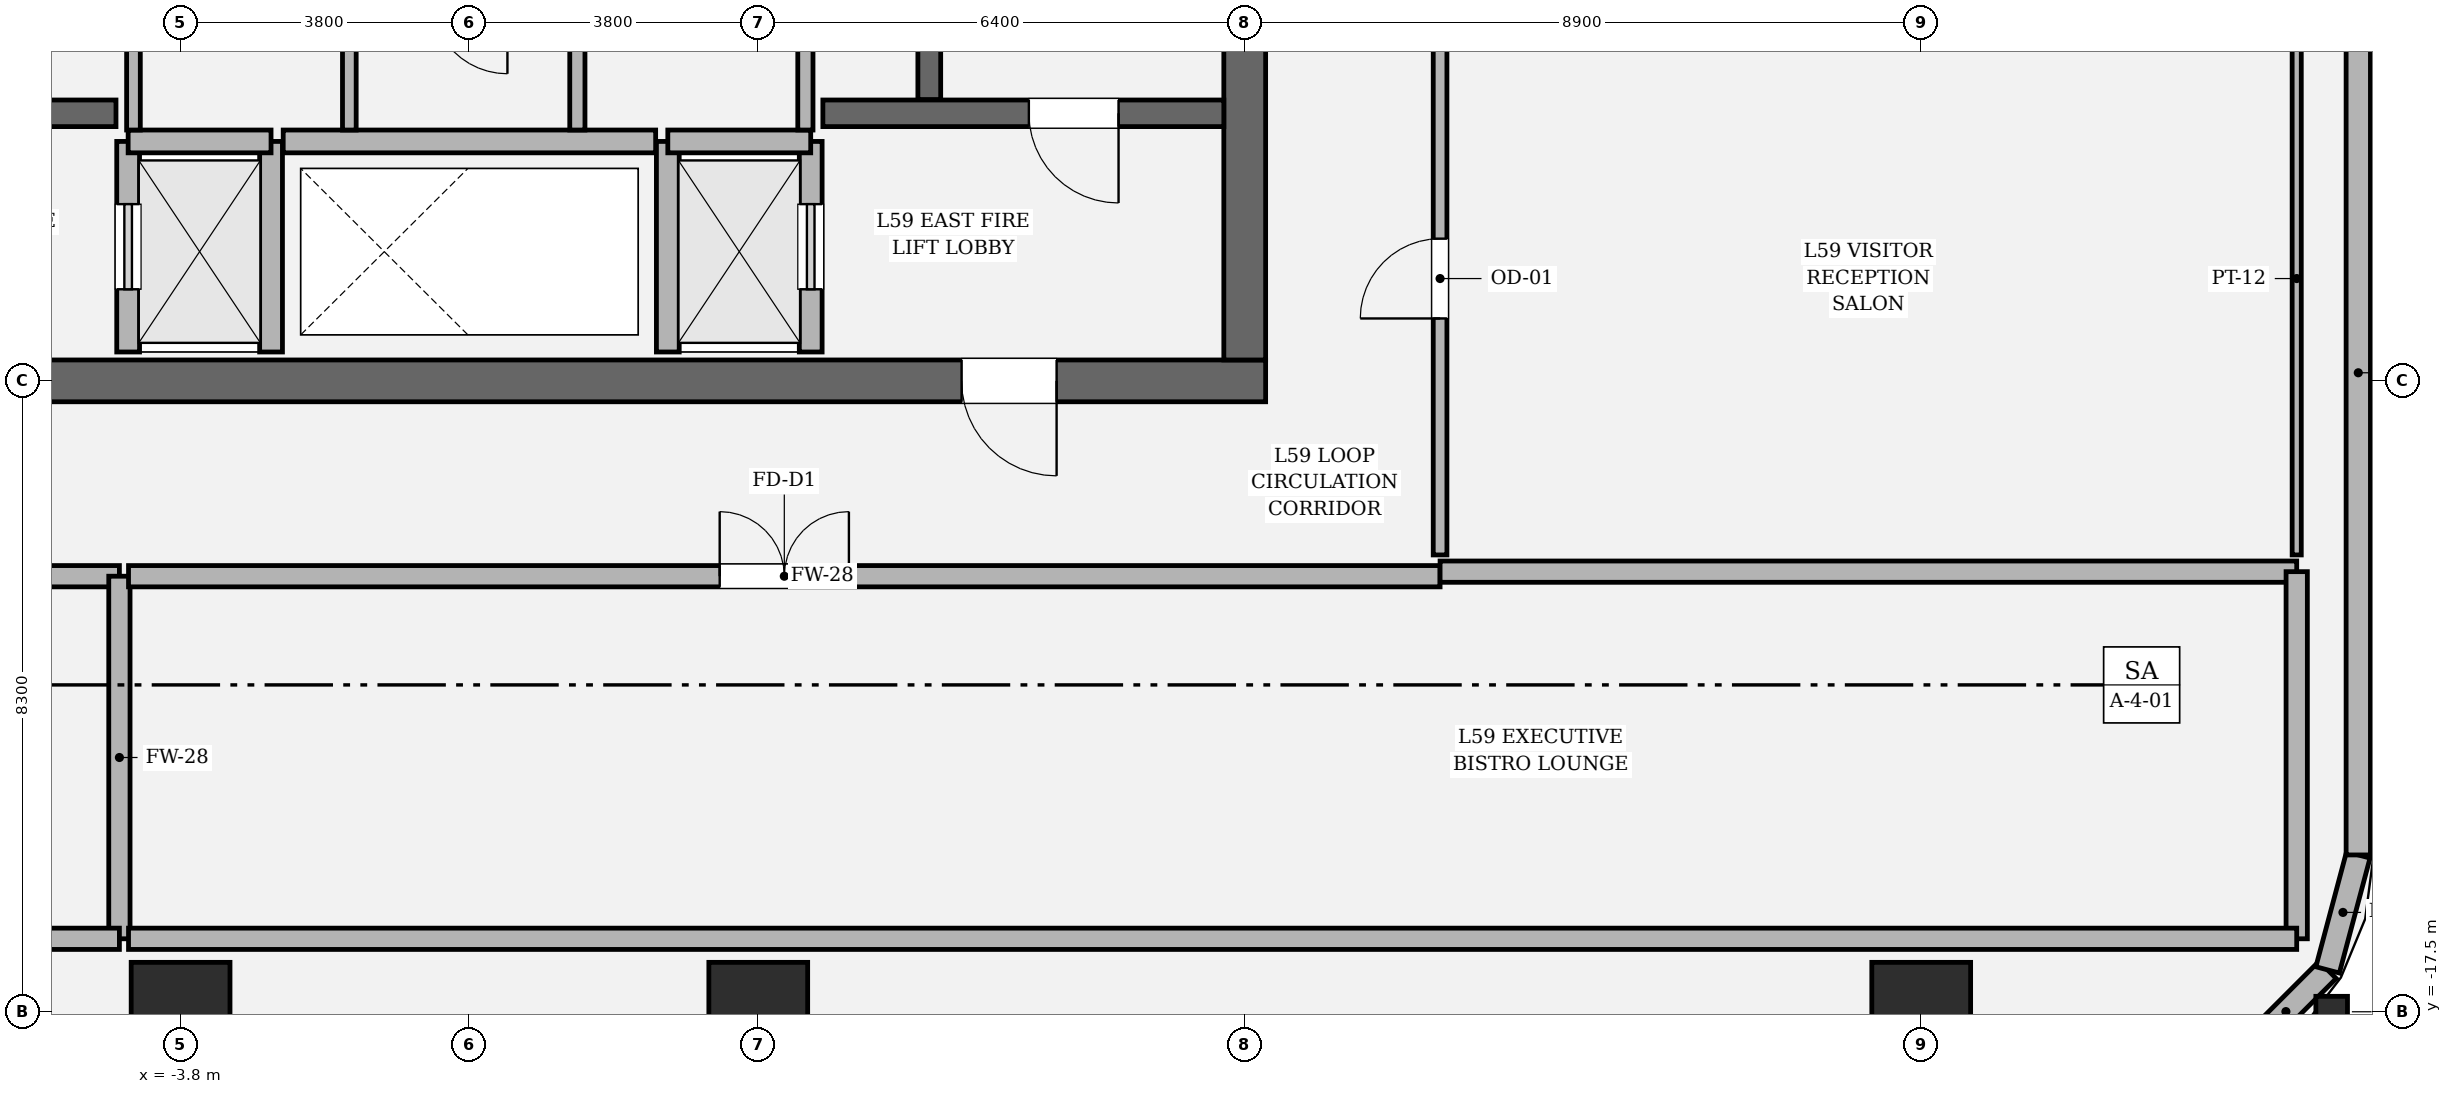
"""IFC4 building model, lengths in metres.
Left out: names, types, materials, properties, quantities, classifications, styles, units other than length and angle.
Written with IfcOpenShell. Run it as: python <this file> out.ifc"""

import sys

from ifc_helpers import new_model, si_unit, direction, frame, frame_2d, origin, origin_2d, place, context, subcontext, project, spatial, rectangle, hollow_rectangle, i_section, extrude, element, fill, save


model = new_model("IFC4")
c1 = context("Model", 3, precision=1e-05, world=origin(), true_north=direction((0.0, 1.0)))
c2 = subcontext(c1, "Body", "Model", "MODEL_VIEW")
j1 = project(units=[si_unit("LENGTHUNIT", "METRE"), si_unit("PLANEANGLEUNIT", "RADIAN")], contexts=[c1])
p1 = place(None, origin())
s1 = spatial("IfcSite", under=j1, at=p1, CompositionType="ELEMENT")
p2 = place(p1, origin())
s2 = spatial("IfcBuilding", under=s1, at=p2, CompositionType="ELEMENT")
p3 = place(p2, frame((0.0, 0.0, 251.4)))
s3 = spatial("IfcBuildingStorey", under=s2, at=p3, CompositionType="ELEMENT", Elevation=251.4)
p4 = place(p3, frame((10.475, -9.2, 0.0), z_axis=(0.0, 0.0, 1.0), x_axis=(-1.0, 0.0, 0.0)))
e1 = element("IfcWall", 1, at=p4, inside=s3, PredefinedType="SHEAR", context=c2, shape_type="SweptSolid", body=[
    extrude(rectangle(XDim=20.95, YDim=0.55, at=frame_2d((10.475, 0.0))), origin(), (0.0, 0.0, 1.0), 4.05),
])
p5 = place(p4, frame((2.75, 0.0, 0.0)))
e2 = element("IfcOpeningElement", 2, at=p5, cuts=e1, PredefinedType="OPENING", context=c2, shape_type="SweptSolid", body=[
    extrude(rectangle(XDim=1.25, YDim=2.25, at=frame_2d((0.625, 1.125))), frame((0.0, 0.285, 0.0), z_axis=(0.0, -1.0, 0.0), x_axis=(1.0, 0.0, 0.0)), (0.0, 0.0, 1.0), 0.57),
])
p6 = place(p4, frame((16.95, 0.0, 0.0)))
e3 = element("IfcOpeningElement", 3, at=p6, cuts=e1, PredefinedType="OPENING", context=c2, shape_type="SweptSolid", body=[
    extrude(rectangle(XDim=1.25, YDim=2.25, at=frame_2d((0.625, 1.125))), frame((0.0, 0.285, 0.0), z_axis=(0.0, -1.0, 0.0), x_axis=(1.0, 0.0, 0.0)), (0.0, 0.0, 1.0), 0.57),
])
p7 = place(p3, frame((10.2, 8.925, 0.0), z_axis=(0.0, 0.0, 1.0), x_axis=(0.0, -1.0, 0.0)))
e4 = element("IfcWall", 4, at=p7, inside=s3, PredefinedType="SHEAR", context=c2, shape_type="SweptSolid", body=[
    extrude(rectangle(XDim=17.85, YDim=0.55, at=frame_2d((8.925, 0.0))), origin(), (0.0, 0.0, 1.0), 4.05),
])
p8 = place(p7, frame((3.955, 0.0, 0.0)))
e5 = element("IfcOpeningElement", 5, at=p8, cuts=e4, PredefinedType="OPENING", context=c2, shape_type="SweptSolid", body=[
    extrude(rectangle(XDim=1.18, YDim=2.2, at=frame_2d((0.59, 1.1))), frame((0.0, 0.285, 0.0), z_axis=(0.0, -1.0, 0.0), x_axis=(1.0, 0.0, 0.0)), (0.0, 0.0, 1.0), 0.57),
])
p9 = place(p3, frame((6.05, 3.45, 0.0), z_axis=(0.0, 0.0, 1.0), x_axis=(0.0, -1.0, 0.0)))
e6 = element("IfcWall", 6, at=p9, inside=s3, PredefinedType="SOLIDWALL", context=c2, shape_type="SweptSolid", body=[
    extrude(rectangle(XDim=8.95, YDim=0.3, at=frame_2d((4.475, 0.0))), origin(), (0.0, 0.0, 1.0), 4.05),
])
p10 = place(p3, frame((-9.925, -5.68, 0.0), z_axis=(0.0, 0.0, 1.0), x_axis=(1.0, 0.0, 0.0)))
e7 = element("IfcWall", 7, at=p10, inside=s3, PredefinedType="SOLIDWALL", context=c2, shape_type="SweptSolid", body=[
    extrude(rectangle(XDim=5.275, YDim=0.35, at=frame_2d((2.638, 0.0))), origin(), (0.0, 0.0, 1.0), 4.05),
])
p11 = place(p10, frame((1.385, 0.0, 0.0)))
e8 = element("IfcOpeningElement", 8, at=p11, cuts=e7, PredefinedType="OPENING", context=c2, shape_type="SweptSolid", body=[
    extrude(rectangle(XDim=1.18, YDim=2.2, at=frame_2d((0.59, 1.1))), frame((0.0, 0.185, 0.0), z_axis=(0.0, -1.0, 0.0), x_axis=(1.0, 0.0, 0.0)), (0.0, 0.0, 1.0), 0.37),
])
p12 = place(p3, frame((4.65, -5.68, 0.0), z_axis=(0.0, 0.0, 1.0), x_axis=(1.0, 0.0, 0.0)))
e9 = element("IfcWall", 9, at=p12, inside=s3, PredefinedType="SOLIDWALL", context=c2, shape_type="SweptSolid", body=[
    extrude(rectangle(XDim=5.275, YDim=0.35, at=frame_2d((2.638, 0.0))), origin(), (0.0, 0.0, 1.0), 4.05),
])
p13 = place(p12, frame((2.71, 0.0, 0.0)))
e10 = element("IfcOpeningElement", 10, at=p13, cuts=e9, PredefinedType="OPENING", context=c2, shape_type="SweptSolid", body=[
    extrude(rectangle(XDim=1.18, YDim=2.2, at=frame_2d((0.59, 1.1))), frame((0.0, 0.185, 0.0), z_axis=(0.0, -1.0, 0.0), x_axis=(1.0, 0.0, 0.0)), (0.0, 0.0, 1.0), 0.37),
])
for number, where, z_axis, x_axis in (
    (11, (-3.8, -17.5, 0.0), (0.0, 0.0, 1.0), (1.0, 0.0, 0.0)),
    (12, (3.8, -17.5, 0.0), (0.0, 0.0, 1.0), (1.0, 0.0, 0.0)),
    (13, (19.1, -17.5, 0.0), (0.0, 0.0, 1.0), (1.0, 0.0, 0.0)),
):
    element("IfcColumn", number, at=place(p3, frame(where, z_axis=z_axis, x_axis=x_axis)), inside=s3, PredefinedType="COLUMN", context=c2, shape_type="SweptSolid", body=[
        extrude(hollow_rectangle(XDim=1.3, YDim=1.3, WallThickness=0.038, at=origin_2d()), origin(), (0.0, 0.0, 1.0), 4.05),
    ])
p14 = place(p3, frame((24.5, -17.5, 0.0), z_axis=(0.0, 0.0, 1.0), x_axis=(0.0, 1.0, 0.0)))
e14 = element("IfcColumn", 14, at=p14, inside=s3, PredefinedType="COLUMN", context=c2, shape_type="SweptSolid", body=[
    extrude(i_section(OverallWidth=0.406, OverallDepth=0.416, WebThickness=0.029, FlangeThickness=0.048, FilletRadius=0.018, at=origin_2d()), origin(), (0.0, 0.0, 1.0), 4.048),
])
p15 = place(p3, frame((23.349, -18.047, 0.0), z_axis=(0.0, 0.0, 1.0), x_axis=(0.707106781187, 0.707106781187, 0.0)))
e15 = element("IfcWall", 15, at=p15, inside=s3, PredefinedType="SOLIDWALL", context=c2, shape_type="SweptSolid", body=[
    extrude(rectangle(XDim=1.552, YDim=0.32, at=frame_2d((0.776, 0.0))), origin(), (0.0, 0.0, 1.0), 2.524),
])
p16 = place(p3, frame((24.447, -16.949, 0.0), z_axis=(0.0, 0.0, 1.0), x_axis=(0.257847112249, 0.966185730957, 0.0)))
e16 = element("IfcWall", 16, at=p16, inside=s3, PredefinedType="SOLIDWALL", context=c2, shape_type="SweptSolid", body=[
    extrude(rectangle(XDim=1.565, YDim=0.32, at=frame_2d((0.783, 0.0))), origin(), (0.0, 0.0, 1.0), 2.564),
])
p17 = place(p3, frame((24.85, -15.437, 0.0), z_axis=(0.0, 0.0, 1.0), x_axis=(0.0, 1.0, 0.0)))
e17 = element("IfcWall", 17, at=p17, inside=s3, PredefinedType="SOLIDWALL", context=c2, shape_type="SweptSolid", body=[
    extrude(rectangle(XDim=12.687, YDim=0.32, at=frame_2d((6.344, 0.0))), origin(), (0.0, 0.0, 1.0), 2.564),
])
p18 = place(p3, frame((-4.49, -8.82, 0.0), z_axis=(0.0, 0.0, 1.0), x_axis=(0.0, 1.0, 0.0)))
e18 = element("IfcWall", 18, at=p18, inside=s3, PredefinedType="SOLIDWALL", context=c2, shape_type="SweptSolid", body=[
    extrude(rectangle(XDim=2.77, YDim=0.3, at=frame_2d((1.385, 0.0))), origin(), (0.0, 0.0, 1.0), 3.85),
])
p19 = place(p18, frame((0.825, 0.0, 0.0)))
e19 = element("IfcOpeningElement", 19, at=p19, cuts=e18, PredefinedType="OPENING", context=c2, shape_type="SweptSolid", body=[
    extrude(rectangle(XDim=1.12, YDim=2.25, at=frame_2d((0.56, 1.125))), frame((0.0, 0.16, 0.0), z_axis=(0.0, -1.0, 0.0), x_axis=(1.0, 0.0, 0.0)), (0.0, 0.0, 1.0), 0.32),
])
p20 = place(p3, frame((-2.61, -8.82, 0.0), z_axis=(0.0, 0.0, 1.0), x_axis=(0.0, 1.0, 0.0)))
e20 = element("IfcWall", 20, at=p20, inside=s3, PredefinedType="SOLIDWALL", context=c2, shape_type="SweptSolid", body=[
    extrude(rectangle(XDim=2.77, YDim=0.3, at=frame_2d((1.385, 0.0))), origin(), (0.0, 0.0, 1.0), 3.85),
])
p21 = place(p3, frame((-4.49, -6.05, 0.0), z_axis=(0.0, 0.0, 1.0), x_axis=(1.0, 0.0, 0.0)))
e21 = element("IfcWall", 21, at=p21, inside=s3, PredefinedType="SOLIDWALL", context=c2, shape_type="SweptSolid", body=[
    extrude(rectangle(XDim=1.88, YDim=0.3, at=frame_2d((0.94, 0.0))), origin(), (0.0, 0.0, 1.0), 3.85),
])
p22 = place(p3, frame((4.49, -8.82, 0.0), z_axis=(0.0, 0.0, 1.0), x_axis=(0.0, 1.0, 0.0)))
e22 = element("IfcWall", 22, at=p22, inside=s3, PredefinedType="SOLIDWALL", context=c2, shape_type="SweptSolid", body=[
    extrude(rectangle(XDim=2.77, YDim=0.3, at=frame_2d((1.385, 0.0))), origin(), (0.0, 0.0, 1.0), 3.85),
])
p23 = place(p22, frame((0.825, 0.0, 0.0)))
e23 = element("IfcOpeningElement", 23, at=p23, cuts=e22, PredefinedType="OPENING", context=c2, shape_type="SweptSolid", body=[
    extrude(rectangle(XDim=1.12, YDim=2.25, at=frame_2d((0.56, 1.125))), frame((0.0, 0.16, 0.0), z_axis=(0.0, -1.0, 0.0), x_axis=(1.0, 0.0, 0.0)), (0.0, 0.0, 1.0), 0.32),
])
p24 = place(p3, frame((2.61, -8.82, 0.0), z_axis=(0.0, 0.0, 1.0), x_axis=(0.0, 1.0, 0.0)))
e24 = element("IfcWall", 24, at=p24, inside=s3, PredefinedType="SOLIDWALL", context=c2, shape_type="SweptSolid", body=[
    extrude(rectangle(XDim=2.77, YDim=0.3, at=frame_2d((1.385, 0.0))), origin(), (0.0, 0.0, 1.0), 3.85),
])
p25 = place(p3, frame((2.61, -6.05, 0.0), z_axis=(0.0, 0.0, 1.0), x_axis=(1.0, 0.0, 0.0)))
e25 = element("IfcWall", 25, at=p25, inside=s3, PredefinedType="SOLIDWALL", context=c2, shape_type="SweptSolid", body=[
    extrude(rectangle(XDim=1.88, YDim=0.3, at=frame_2d((0.94, 0.0))), origin(), (0.0, 0.0, 1.0), 3.85),
])
p26 = place(p3, frame((-2.45, -6.05, 0.0), z_axis=(0.0, 0.0, 1.0), x_axis=(1.0, 0.0, 0.0)))
e26 = element("IfcWall", 26, at=p26, inside=s3, PredefinedType="SOLIDWALL", context=c2, shape_type="SweptSolid", body=[
    extrude(rectangle(XDim=4.9, YDim=0.3, at=frame_2d((2.45, 0.0))), origin(), (0.0, 0.0, 1.0), 3.85),
])
for number, where, z_axis, x_axis in (
    (27, (-1.58, -5.9, 0.0), (0.0, 0.0, 1.0), (0.0, 1.0, 0.0)),
    (28, (-4.42, -4.16, 0.0), (0.0, 0.0, 1.0), (0.0, -1.0, 0.0)),
):
    element("IfcWall", number, at=place(p3, frame(where, z_axis=z_axis, x_axis=x_axis)), inside=s3, PredefinedType="PARTITIONING", context=c2, shape_type="SweptSolid", body=[
        extrude(rectangle(XDim=1.74, YDim=0.18, at=frame_2d((0.87, 0.0))), origin(), (0.0, 0.0, 1.0), 3.85),
    ])
for number, where, z_axis, x_axis in (
    (29, (1.42, -5.9, 0.0), (0.0, 0.0, 1.0), (0.0, 1.0, 0.0)),
    (30, (4.42, -5.9, 0.0), (0.0, 0.0, 1.0), (0.0, 1.0, 0.0)),
):
    element("IfcWall", number, at=place(p3, frame(where, z_axis=z_axis, x_axis=x_axis)), inside=s3, PredefinedType="SOLIDWALL", context=c2, shape_type="SweptSolid", body=[
        extrude(rectangle(XDim=1.74, YDim=0.2, at=frame_2d((0.87, 0.0))), origin(), (0.0, 0.0, 1.0), 3.85),
    ])
p27 = place(p3, frame((-12.77, -11.77, 0.0), z_axis=(0.0, 0.0, 1.0), x_axis=(1.0, 0.0, 0.0)))
e31 = element("IfcWall", 31, at=p27, inside=s3, PredefinedType="SOLIDWALL", context=c2, shape_type="SweptSolid", body=[
    extrude(rectangle(XDim=8.165, YDim=0.28, at=frame_2d((4.083, 0.0))), origin(), (0.0, 0.0, 1.0), 3.244),
])
p28 = place(p27, frame((3.232, 0.0, 0.0)))
e32 = element("IfcOpeningElement", 32, at=p28, cuts=e31, PredefinedType="OPENING", context=c2, shape_type="SweptSolid", body=[
    extrude(rectangle(XDim=1.7, YDim=2.3, at=frame_2d((0.85, 1.15))), frame((0.0, 0.15, 0.0), z_axis=(0.0, -1.0, 0.0), x_axis=(1.0, 0.0, 0.0)), (0.0, 0.0, 1.0), 0.3),
])
p29 = place(p3, frame((-4.605, -11.77, 0.0), z_axis=(0.0, 0.0, 1.0), x_axis=(0.0, -1.0, 0.0)))
e33 = element("IfcWall", 33, at=p29, inside=s3, PredefinedType="SOLIDWALL", context=c2, shape_type="SweptSolid", body=[
    extrude(rectangle(XDim=4.77, YDim=0.28, at=frame_2d((2.385, 0.0))), origin(), (0.0, 0.0, 1.0), 3.85),
])
p30 = place(p3, frame((-4.605, -16.54, 0.0), z_axis=(0.0, 0.0, 1.0), x_axis=(-1.0, 0.0, 0.0)))
e34 = element("IfcWall", 34, at=p30, inside=s3, PredefinedType="SOLIDWALL", context=c2, shape_type="SweptSolid", body=[
    extrude(rectangle(XDim=13.535, YDim=0.28, at=frame_2d((6.768, 0.0))), origin(), (0.0, 0.0, 1.0), 3.244),
])
p31 = place(p3, frame((-4.485, -11.77, 0.0), z_axis=(0.0, 0.0, 1.0), x_axis=(1.0, 0.0, 0.0)))
e35 = element("IfcWall", 35, at=p31, inside=s3, PredefinedType="SOLIDWALL", context=c2, shape_type="SweptSolid", body=[
    extrude(rectangle(XDim=17.255, YDim=0.28, at=frame_2d((8.627, 0.0))), origin(), (0.0, 0.0, 1.0), 3.244),
])
p32 = place(p31, frame((7.778, 0.0, 0.0)))
e36 = element("IfcOpeningElement", 36, at=p32, cuts=e35, PredefinedType="OPENING", context=c2, shape_type="SweptSolid", body=[
    extrude(rectangle(XDim=1.7, YDim=2.3, at=frame_2d((0.85, 1.15))), frame((0.0, 0.15, 0.0), z_axis=(0.0, -1.0, 0.0), x_axis=(1.0, 0.0, 0.0)), (0.0, 0.0, 1.0), 0.3),
])
p33 = place(p3, frame((12.77, -11.71, 0.0), z_axis=(0.0, 0.0, 1.0), x_axis=(1.0, 0.0, 0.0)))
e37 = element("IfcWall", 37, at=p33, inside=s3, PredefinedType="SOLIDWALL", context=c2, shape_type="SweptSolid", body=[
    extrude(rectangle(XDim=11.27, YDim=0.28, at=frame_2d((5.635, 0.0))), origin(), (0.0, 0.0, 1.0), 3.244),
])
p34 = place(p3, frame((24.04, -11.71, 0.0), z_axis=(0.0, 0.0, 1.0), x_axis=(0.0, -1.0, 0.0)))
e38 = element("IfcWall", 38, at=p34, inside=s3, PredefinedType="SOLIDWALL", context=c2, shape_type="SweptSolid", body=[
    extrude(rectangle(XDim=4.83, YDim=0.28, at=frame_2d((2.415, 0.0))), origin(), (0.0, 0.0, 1.0), 3.85),
])
p35 = place(p3, frame((24.04, -16.54, 0.0), z_axis=(0.0, 0.0, 1.0), x_axis=(-1.0, 0.0, 0.0)))
e39 = element("IfcWall", 39, at=p35, inside=s3, PredefinedType="SOLIDWALL", context=c2, shape_type="SweptSolid", body=[
    extrude(rectangle(XDim=28.525, YDim=0.28, at=frame_2d((14.263, 0.0))), origin(), (0.0, 0.0, 1.0), 3.244),
])
p36 = place(p3, frame((12.77, -11.49, 0.0), z_axis=(0.0, 0.0, 1.0), x_axis=(0.0, 1.0, 0.0)))
e40 = element("IfcWall", 40, at=p36, inside=s3, PredefinedType="PARTITIONING", context=c2, shape_type="SweptSolid", body=[
    extrude(rectangle(XDim=7.272, YDim=0.18, at=frame_2d((3.636, 0.0))), origin(), (0.0, 0.0, 1.0), 3.244),
])
p37 = place(p36, frame((3.111, 0.0, 0.0)))
e41 = element("IfcOpeningElement", 41, at=p37, cuts=e40, PredefinedType="OPENING", context=c2, shape_type="SweptSolid", body=[
    extrude(rectangle(XDim=1.05, YDim=2.2, at=frame_2d((0.525, 1.1))), frame((0.0, 0.1, 0.0), z_axis=(0.0, -1.0, 0.0), x_axis=(1.0, 0.0, 0.0)), (0.0, 0.0, 1.0), 0.2),
])
p38 = place(p3, frame((24.04, -4.218, 0.0), z_axis=(0.0, 0.0, 1.0), x_axis=(0.0, -1.0, 0.0)))
e42 = element("IfcWall", 42, at=p38, inside=s3, PredefinedType="PARTITIONING", context=c2, shape_type="SweptSolid", body=[
    extrude(rectangle(XDim=7.272, YDim=0.12, at=frame_2d((3.636, 0.0))), origin(), (0.0, 0.0, 1.0), 3.85),
])
p39 = place(p13, origin())
e43 = element("IfcDoor", 43, at=p39, inside=s3, OperationType="SINGLE_SWING_RIGHT", PredefinedType="DOOR", context=c2, shape_type="SweptSolid", body=[
    extrude(rectangle(XDim=1.18, YDim=2.2, at=frame_2d((0.59, 1.1))), frame((0.0, 0.025, 0.0), z_axis=(0.0, -1.0, 0.0), x_axis=(1.0, 0.0, 0.0)), (0.0, 0.0, 1.0), 0.05),
])
fill(e10, e43)
p40 = place(p5, origin())
e44 = element("IfcDoor", 44, at=p40, inside=s3, OperationType="SINGLE_SWING_LEFT", PredefinedType="DOOR", context=c2, shape_type="SweptSolid", body=[
    extrude(rectangle(XDim=1.25, YDim=2.25, at=frame_2d((0.625, 1.125))), frame((0.0, 0.025, 0.0), z_axis=(0.0, -1.0, 0.0), x_axis=(1.0, 0.0, 0.0)), (0.0, 0.0, 1.0), 0.05),
])
fill(e2, e44)
p41 = place(p19, origin())
e45 = element("IfcDoor", 45, at=p41, inside=s3, OperationType="SLIDING_TO_LEFT", PredefinedType="DOOR", context=c2, shape_type="SweptSolid", body=[
    extrude(rectangle(XDim=1.12, YDim=2.25, at=frame_2d((0.56, 1.125))), frame((0.0, 0.025, 0.0), z_axis=(0.0, -1.0, 0.0), x_axis=(1.0, 0.0, 0.0)), (0.0, 0.0, 1.0), 0.05),
])
fill(e19, e45)
p42 = place(p23, origin())
e46 = element("IfcDoor", 46, at=p42, inside=s3, OperationType="SLIDING_TO_RIGHT", PredefinedType="DOOR", context=c2, shape_type="SweptSolid", body=[
    extrude(rectangle(XDim=1.12, YDim=2.25, at=frame_2d((0.56, 1.125))), frame((0.0, 0.025, 0.0), z_axis=(0.0, -1.0, 0.0), x_axis=(1.0, 0.0, 0.0)), (0.0, 0.0, 1.0), 0.05),
])
fill(e23, e46)
p43 = place(p32, origin())
e47 = element("IfcDoor", 47, at=p43, inside=s3, OperationType="DOUBLE_DOOR_SINGLE_SWING", PredefinedType="DOOR", context=c2, shape_type="SweptSolid", body=[
    extrude(rectangle(XDim=1.7, YDim=2.3, at=frame_2d((0.85, 1.15))), frame((0.0, 0.025, 0.0), z_axis=(0.0, -1.0, 0.0), x_axis=(1.0, 0.0, 0.0)), (0.0, 0.0, 1.0), 0.05),
])
fill(e36, e47)
p44 = place(p37, origin())
e48 = element("IfcDoor", 48, at=p44, inside=s3, OperationType="SINGLE_SWING_LEFT", PredefinedType="DOOR", context=c2, shape_type="SweptSolid", body=[
    extrude(rectangle(XDim=1.05, YDim=2.2, at=frame_2d((0.525, 1.1))), frame((0.0, 0.025, 0.0), z_axis=(0.0, -1.0, 0.0), x_axis=(1.0, 0.0, 0.0)), (0.0, 0.0, 1.0), 0.05),
])
fill(e41, e48)
save(model, sys.argv[1])
